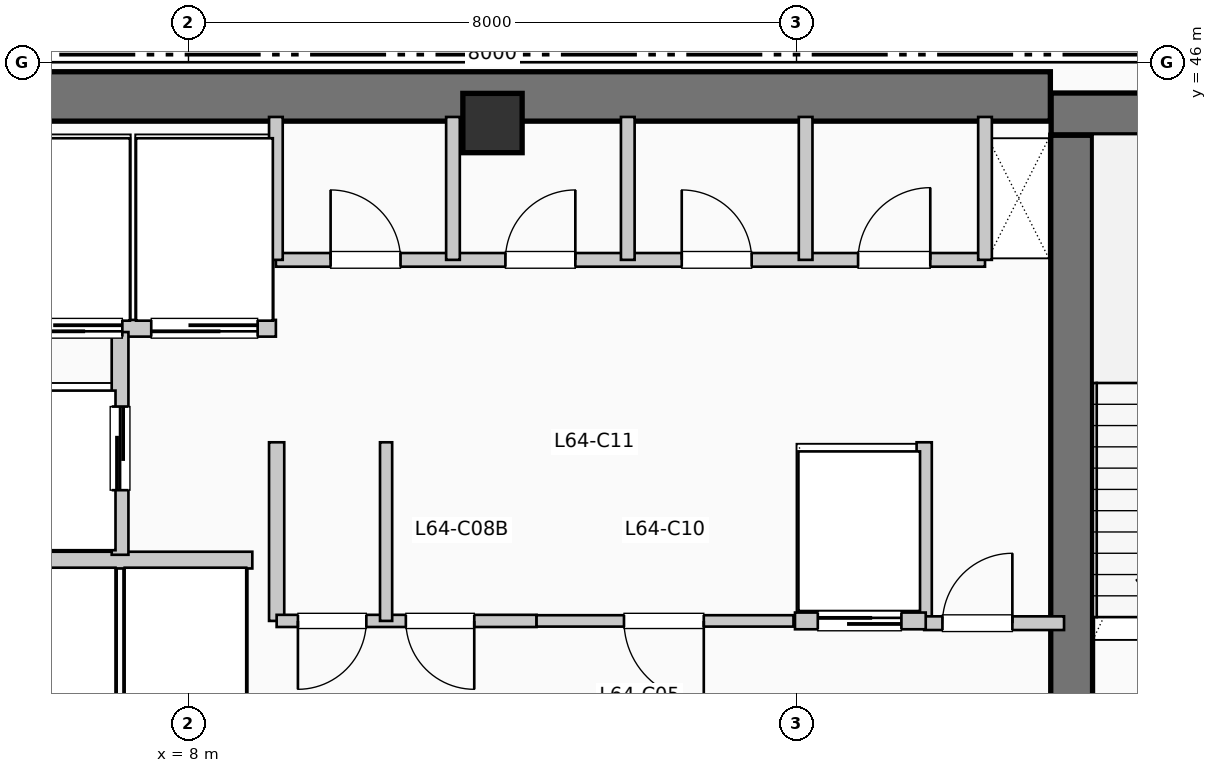
"""IFC4 building model, lengths in metres.
Left out: names, types, materials, properties, quantities, classifications, styles, units other than length and angle.
Written with IfcOpenShell. Run it as: python <this file> out.ifc"""

import sys

from ifc_helpers import new_model, si_unit, direction, frame, frame_2d, origin, origin_2d, place, context, subcontext, project, spatial, rectangle, extrude, element, fill, save


model = new_model("IFC4")
c1 = context("Model", 3, precision=1e-05, world=origin(), true_north=direction((0.0, 1.0)))
c2 = subcontext(c1, "Body", "Model", "MODEL_VIEW")
j1 = project(units=[si_unit("LENGTHUNIT", "METRE"), si_unit("PLANEANGLEUNIT", "RADIAN")], contexts=[c1])
p1 = place(None, origin())
s1 = spatial("IfcSite", under=j1, at=p1, CompositionType="ELEMENT")
p2 = place(p1, origin())
s2 = spatial("IfcBuilding", under=s1, at=p2, CompositionType="ELEMENT")
p3 = place(p2, frame((0.0, 0.0, 264.33)))
s3 = spatial("IfcBuildingStorey", under=s2, at=p3, CompositionType="ELEMENT", Elevation=264.33)
p4 = place(p3, frame((5.36, 45.55, 0.0), z_axis=(0.0, 0.0, 1.0), x_axis=(1.0, 0.0, 0.0)))
e1 = element("IfcWall", 1, at=p4, inside=s3, PredefinedType="SHEAR", context=c2, shape_type="SweptSolid", body=[
    extrude(rectangle(XDim=13.98, YDim=0.65, at=frame_2d((6.99, 0.0))), origin(), (0.0, 0.0, 1.0), 3.96),
])
p5 = place(p3, frame((19.62, 37.15, 0.0), z_axis=(0.0, 0.0, 1.0), x_axis=(0.0, 1.0, 0.0)))
e2 = element("IfcWall", 2, at=p5, inside=s3, PredefinedType="SHEAR", context=c2, shape_type="SweptSolid", body=[
    extrude(rectangle(XDim=7.89, YDim=0.55, at=frame_2d((3.945, 0.0))), origin(), (0.0, 0.0, 1.0), 3.96),
])
p6 = place(p3, frame((19.35, 45.32, 0.0), z_axis=(0.0, 0.0, 1.0), x_axis=(1.0, 0.0, 0.0)))
e3 = element("IfcWall", 3, at=p6, inside=s3, PredefinedType="SHEAR", context=c2, shape_type="SweptSolid", body=[
    extrude(rectangle(XDim=3.69, YDim=0.55, at=frame_2d((1.845, 0.0))), origin(), (0.0, 0.0, 1.0), 3.96),
])
p7 = place(p6, frame((1.15, 0.0, 1.05)))
e4 = element("IfcOpeningElement", 4, at=p7, cuts=e3, PredefinedType="OPENING", context=c2, shape_type="SweptSolid", body=[
    extrude(rectangle(XDim=1.4, YDim=1.8, at=frame_2d((0.7, 0.9))), frame((0.0, 0.285, 0.0), z_axis=(0.0, -1.0, 0.0), x_axis=(1.0, 0.0, 0.0)), (0.0, 0.0, 1.0), 0.57),
])
p8 = place(p3, frame((12.0, 45.2, 0.0), z_axis=(0.0, 0.0, 1.0), x_axis=(1.0, 0.0, 0.0)))
e5 = element("IfcColumn", 5, at=p8, inside=s3, PredefinedType="COLUMN", context=c2, shape_type="SweptSolid", body=[
    extrude(rectangle(XDim=0.78, YDim=0.78, at=origin_2d()), origin(), (0.0, 0.0, 1.0), 3.96),
])
p9 = place(p3, frame((5.38, 39.45, 0.0), z_axis=(0.0, 0.0, 1.0), x_axis=(1.0, 0.0, 0.0)))
e6 = element("IfcWall", 6, at=p9, inside=s3, PredefinedType="PARTITIONING", context=c2, shape_type="SweptSolid", body=[
    extrude(rectangle(XDim=3.46, YDim=0.22, at=frame_2d((1.73, 0.0))), origin(), (0.0, 0.0, 1.0), 3.71),
])
p10 = place(p3, frame((5.38, 42.5, 0.0), z_axis=(0.0, 0.0, 1.0), x_axis=(1.0, 0.0, 0.0)))
e7 = element("IfcWall", 7, at=p10, inside=s3, PredefinedType="PARTITIONING", context=c2, shape_type="SweptSolid", body=[
    extrude(rectangle(XDim=3.77, YDim=0.22, at=frame_2d((1.885, 0.0))), origin(), (0.0, 0.0, 1.0), 3.71),
])
p11 = place(p10, frame((1.75, 0.0, 0.0), z_axis=(0.0, 0.0, 1.0), x_axis=(-1.0, 0.0, 0.0)))
e8 = element("IfcOpeningElement", 8, at=p11, cuts=e7, PredefinedType="OPENING", context=c2, shape_type="SweptSolid", body=[
    extrude(rectangle(XDim=1.4, YDim=2.2, at=frame_2d((0.7, 1.1))), frame((0.0, 0.12, 0.0), z_axis=(0.0, -1.0, 0.0), x_axis=(1.0, 0.0, 0.0)), (0.0, 0.0, 1.0), 0.24),
])
p12 = place(p10, frame((3.53, 0.0, 0.0), z_axis=(0.0, 0.0, 1.0), x_axis=(-1.0, 0.0, 0.0)))
e9 = element("IfcOpeningElement", 9, at=p12, cuts=e7, PredefinedType="OPENING", context=c2, shape_type="SweptSolid", body=[
    extrude(rectangle(XDim=1.4, YDim=2.2, at=frame_2d((0.7, 1.1))), frame((0.0, 0.12, 0.0), z_axis=(0.0, -1.0, 0.0), x_axis=(1.0, 0.0, 0.0)), (0.0, 0.0, 1.0), 0.24),
])
p13 = place(p3, frame((7.1, 39.52, 0.0), z_axis=(0.0, 0.0, 1.0), x_axis=(0.0, 1.0, 0.0)))
e10 = element("IfcWall", 10, at=p13, inside=s3, PredefinedType="PARTITIONING", context=c2, shape_type="SweptSolid", body=[
    extrude(rectangle(XDim=2.93, YDim=0.22, at=frame_2d((1.465, 0.0))), origin(), (0.0, 0.0, 1.0), 3.71),
])
p14 = place(p13, frame((0.85, 0.0, 0.0)))
e11 = element("IfcOpeningElement", 11, at=p14, cuts=e10, PredefinedType="OPENING", context=c2, shape_type="SweptSolid", body=[
    extrude(rectangle(XDim=1.1, YDim=2.2, at=frame_2d((0.55, 1.1))), frame((0.0, 0.12, 0.0), z_axis=(0.0, -1.0, 0.0), x_axis=(1.0, 0.0, 0.0)), (0.0, 0.0, 1.0), 0.24),
])
for number, where, z_axis, x_axis in (
    (12, (9.16, 38.65, 0.0), (0.0, 0.0, 1.0), (0.0, 1.0, 0.0)),
    (13, (17.68, 38.65, 0.0), (0.0, 0.0, 1.0), (0.0, 1.0, 0.0)),
):
    element("IfcWall", number, at=place(p3, frame(where, z_axis=z_axis, x_axis=x_axis)), inside=s3, PredefinedType="PARTITIONING", context=c2, shape_type="SweptSolid", body=[
        extrude(rectangle(XDim=2.35, YDim=0.2, at=frame_2d((1.175, 0.0))), origin(), (0.0, 0.0, 1.0), 3.71),
    ])
p15 = place(p3, frame((17.68, 38.62, 0.0), z_axis=(0.0, 0.0, 1.0), x_axis=(1.0, 0.0, 0.0)))
e14 = element("IfcWall", 14, at=p15, inside=s3, PredefinedType="PARTITIONING", context=c2, shape_type="SweptSolid", body=[
    extrude(rectangle(XDim=1.84, YDim=0.18, at=frame_2d((0.92, 0.0))), origin(), (0.0, 0.0, 1.0), 3.71),
])
p16 = place(p15, frame((0.24, 0.0, 0.0)))
e15 = element("IfcOpeningElement", 15, at=p16, cuts=e14, PredefinedType="OPENING", context=c2, shape_type="SweptSolid", body=[
    extrude(rectangle(XDim=0.92, YDim=2.1, at=frame_2d((0.46, 1.05))), frame((0.0, 0.1, 0.0), z_axis=(0.0, -1.0, 0.0), x_axis=(1.0, 0.0, 0.0)), (0.0, 0.0, 1.0), 0.2),
])
p17 = place(p3, frame((9.16, 38.65, 0.0), z_axis=(0.0, 0.0, 1.0), x_axis=(1.0, 0.0, 0.0)))
e16 = element("IfcWall", 16, at=p17, inside=s3, PredefinedType="PARTITIONING", context=c2, shape_type="SweptSolid", body=[
    extrude(rectangle(XDim=3.42, YDim=0.16, at=frame_2d((1.71, 0.0))), origin(), (0.0, 0.0, 1.0), 3.71),
])
p18 = place(p17, frame((1.18, 0.0, 0.0), z_axis=(0.0, 0.0, 1.0), x_axis=(-1.0, 0.0, 0.0)))
e17 = element("IfcOpeningElement", 17, at=p18, cuts=e16, PredefinedType="OPENING", context=c2, shape_type="SweptSolid", body=[
    extrude(rectangle(XDim=0.9, YDim=2.15, at=frame_2d((0.45, 1.075))), frame((0.0, 0.09, 0.0), z_axis=(0.0, -1.0, 0.0), x_axis=(1.0, 0.0, 0.0)), (0.0, 0.0, 1.0), 0.18),
])
p19 = place(p17, frame((2.6, 0.0, 0.0), z_axis=(0.0, 0.0, 1.0), x_axis=(-1.0, 0.0, 0.0)))
e18 = element("IfcOpeningElement", 18, at=p19, cuts=e16, PredefinedType="OPENING", context=c2, shape_type="SweptSolid", body=[
    extrude(rectangle(XDim=0.9, YDim=2.15, at=frame_2d((0.45, 1.075))), frame((0.0, 0.09, 0.0), z_axis=(0.0, -1.0, 0.0), x_axis=(1.0, 0.0, 0.0)), (0.0, 0.0, 1.0), 0.18),
])
p20 = place(p3, frame((10.6, 38.65, 0.0), z_axis=(0.0, 0.0, 1.0), x_axis=(0.0, 1.0, 0.0)))
e19 = element("IfcWall", 19, at=p20, inside=s3, PredefinedType="PARTITIONING", context=c2, shape_type="SweptSolid", body=[
    extrude(rectangle(XDim=2.35, YDim=0.16, at=frame_2d((1.175, 0.0))), origin(), (0.0, 0.0, 1.0), 3.71),
])
p21 = place(p3, frame((12.58, 38.65, 0.0), z_axis=(0.0, 0.0, 1.0), x_axis=(1.0, 0.0, 0.0)))
e20 = element("IfcWall", 20, at=p21, inside=s3, PredefinedType="PARTITIONING", context=c2, shape_type="SweptSolid", body=[
    extrude(rectangle(XDim=3.38, YDim=0.15, at=frame_2d((1.69, 0.0))), origin(), (0.0, 0.0, 1.0), 3.71),
])
p22 = place(p21, frame((2.2, 0.0, 0.0), z_axis=(0.0, 0.0, 1.0), x_axis=(-1.0, 0.0, 0.0)))
e21 = element("IfcOpeningElement", 21, at=p22, cuts=e20, PredefinedType="OPENING", context=c2, shape_type="SweptSolid", body=[
    extrude(rectangle(XDim=1.05, YDim=2.15, at=frame_2d((0.525, 1.075))), frame((0.0, 0.085, 0.0), z_axis=(0.0, -1.0, 0.0), x_axis=(1.0, 0.0, 0.0)), (0.0, 0.0, 1.0), 0.17),
])
p23 = place(p3, frame((15.98, 38.65, 0.0), z_axis=(0.0, 0.0, 1.0), x_axis=(1.0, 0.0, 0.0)))
e22 = element("IfcWall", 22, at=p23, inside=s3, PredefinedType="PARTITIONING", context=c2, shape_type="SweptSolid", body=[
    extrude(rectangle(XDim=1.72, YDim=0.22, at=frame_2d((0.86, 0.0))), origin(), (0.0, 0.0, 1.0), 3.71),
])
p24 = place(p23, frame((0.3, 0.0, 0.0)))
e23 = element("IfcOpeningElement", 23, at=p24, cuts=e22, PredefinedType="OPENING", context=c2, shape_type="SweptSolid", body=[
    extrude(rectangle(XDim=1.1, YDim=2.2, at=frame_2d((0.55, 1.1))), frame((0.0, 0.12, 0.0), z_axis=(0.0, -1.0, 0.0), x_axis=(1.0, 0.0, 0.0)), (0.0, 0.0, 1.0), 0.24),
])
p25 = place(p3, frame((9.15, 43.4, 0.0), z_axis=(0.0, 0.0, 1.0), x_axis=(1.0, 0.0, 0.0)))
e24 = element("IfcWall", 24, at=p25, inside=s3, PredefinedType="PLUMBINGWALL", context=c2, shape_type="SweptSolid", body=[
    extrude(rectangle(XDim=9.33, YDim=0.18, at=frame_2d((4.665, 0.0))), origin(), (0.0, 0.0, 1.0), 3.71),
])
p26 = place(p25, frame((0.72, 0.0, 0.0)))
e25 = element("IfcOpeningElement", 25, at=p26, cuts=e24, PredefinedType="OPENING", context=c2, shape_type="SweptSolid", body=[
    extrude(rectangle(XDim=0.92, YDim=2.1, at=frame_2d((0.46, 1.05))), frame((0.0, 0.1, 0.0), z_axis=(0.0, -1.0, 0.0), x_axis=(1.0, 0.0, 0.0)), (0.0, 0.0, 1.0), 0.2),
])
p27 = place(p25, frame((3.02, 0.0, 0.0)))
e26 = element("IfcOpeningElement", 26, at=p27, cuts=e24, PredefinedType="OPENING", context=c2, shape_type="SweptSolid", body=[
    extrude(rectangle(XDim=0.92, YDim=2.1, at=frame_2d((0.46, 1.05))), frame((0.0, 0.1, 0.0), z_axis=(0.0, -1.0, 0.0), x_axis=(1.0, 0.0, 0.0)), (0.0, 0.0, 1.0), 0.2),
])
p28 = place(p25, frame((5.34, 0.0, 0.0)))
e27 = element("IfcOpeningElement", 27, at=p28, cuts=e24, PredefinedType="OPENING", context=c2, shape_type="SweptSolid", body=[
    extrude(rectangle(XDim=0.92, YDim=2.1, at=frame_2d((0.46, 1.05))), frame((0.0, 0.1, 0.0), z_axis=(0.0, -1.0, 0.0), x_axis=(1.0, 0.0, 0.0)), (0.0, 0.0, 1.0), 0.2),
])
p29 = place(p25, frame((7.66, 0.0, 0.0)))
e28 = element("IfcOpeningElement", 28, at=p29, cuts=e24, PredefinedType="OPENING", context=c2, shape_type="SweptSolid", body=[
    extrude(rectangle(XDim=0.95, YDim=2.1, at=frame_2d((0.475, 1.05))), frame((0.0, 0.1, 0.0), z_axis=(0.0, -1.0, 0.0), x_axis=(1.0, 0.0, 0.0)), (0.0, 0.0, 1.0), 0.2),
])
for number, where, z_axis, x_axis in (
    (29, (9.15, 43.4, 0.0), (0.0, 0.0, 1.0), (0.0, 1.0, 0.0)),
    (30, (18.48, 43.4, 0.0), (0.0, 0.0, 1.0), (0.0, 1.0, 0.0)),
    (31, (11.48, 43.4, 0.0), (0.0, 0.0, 1.0), (0.0, 1.0, 0.0)),
    (32, (13.78, 43.4, 0.0), (0.0, 0.0, 1.0), (0.0, 1.0, 0.0)),
    (33, (16.12, 43.4, 0.0), (0.0, 0.0, 1.0), (0.0, 1.0, 0.0)),
):
    element("IfcWall", number, at=place(p3, frame(where, z_axis=z_axis, x_axis=x_axis)), inside=s3, PredefinedType="PLUMBINGWALL", context=c2, shape_type="SweptSolid", body=[
        extrude(rectangle(XDim=1.88, YDim=0.18, at=frame_2d((0.94, 0.0))), origin(), (0.0, 0.0, 1.0), 3.71),
    ])
p30 = place(p11, origin())
e34 = element("IfcDoor", 34, at=p30, inside=s3, OperationType="SLIDING_TO_LEFT", PredefinedType="DOOR", context=c2, shape_type="SweptSolid", body=[
    extrude(rectangle(XDim=1.4, YDim=2.2, at=frame_2d((0.7, 1.1))), frame((0.0, 0.025, 0.0), z_axis=(0.0, -1.0, 0.0), x_axis=(1.0, 0.0, 0.0)), (0.0, 0.0, 1.0), 0.05),
])
fill(e8, e34)
p31 = place(p12, origin())
e35 = element("IfcDoor", 35, at=p31, inside=s3, OperationType="SLIDING_TO_LEFT", PredefinedType="DOOR", context=c2, shape_type="SweptSolid", body=[
    extrude(rectangle(XDim=1.4, YDim=2.2, at=frame_2d((0.7, 1.1))), frame((0.0, 0.025, 0.0), z_axis=(0.0, -1.0, 0.0), x_axis=(1.0, 0.0, 0.0)), (0.0, 0.0, 1.0), 0.05),
])
fill(e9, e35)
p32 = place(p14, origin())
e36 = element("IfcDoor", 36, at=p32, inside=s3, OperationType="SLIDING_TO_LEFT", PredefinedType="DOOR", context=c2, shape_type="SweptSolid", body=[
    extrude(rectangle(XDim=1.1, YDim=2.2, at=frame_2d((0.55, 1.1))), frame((0.0, 0.025, 0.0), z_axis=(0.0, -1.0, 0.0), x_axis=(1.0, 0.0, 0.0)), (0.0, 0.0, 1.0), 0.05),
])
fill(e11, e36)
p33 = place(p16, origin())
e37 = element("IfcDoor", 37, at=p33, inside=s3, OperationType="SINGLE_SWING_RIGHT", PredefinedType="DOOR", context=c2, shape_type="SweptSolid", body=[
    extrude(rectangle(XDim=0.92, YDim=2.1, at=frame_2d((0.46, 1.05))), frame((0.0, 0.025, 0.0), z_axis=(0.0, -1.0, 0.0), x_axis=(1.0, 0.0, 0.0)), (0.0, 0.0, 1.0), 0.05),
])
fill(e15, e37)
p34 = place(p18, origin())
e38 = element("IfcDoor", 38, at=p34, inside=s3, OperationType="SINGLE_SWING_LEFT", PredefinedType="DOOR", context=c2, shape_type="SweptSolid", body=[
    extrude(rectangle(XDim=0.9, YDim=2.15, at=frame_2d((0.45, 1.075))), frame((0.0, 0.025, 0.0), z_axis=(0.0, -1.0, 0.0), x_axis=(1.0, 0.0, 0.0)), (0.0, 0.0, 1.0), 0.05),
])
fill(e17, e38)
p35 = place(p19, origin())
e39 = element("IfcDoor", 39, at=p35, inside=s3, OperationType="SINGLE_SWING_RIGHT", PredefinedType="DOOR", context=c2, shape_type="SweptSolid", body=[
    extrude(rectangle(XDim=0.9, YDim=2.15, at=frame_2d((0.45, 1.075))), frame((0.0, 0.025, 0.0), z_axis=(0.0, -1.0, 0.0), x_axis=(1.0, 0.0, 0.0)), (0.0, 0.0, 1.0), 0.05),
])
fill(e18, e39)
p36 = place(p22, origin())
e40 = element("IfcDoor", 40, at=p36, inside=s3, OperationType="SINGLE_SWING_RIGHT", PredefinedType="DOOR", context=c2, shape_type="SweptSolid", body=[
    extrude(rectangle(XDim=1.05, YDim=2.15, at=frame_2d((0.525, 1.075))), frame((0.0, 0.025, 0.0), z_axis=(0.0, -1.0, 0.0), x_axis=(1.0, 0.0, 0.0)), (0.0, 0.0, 1.0), 0.05),
])
fill(e21, e40)
p37 = place(p24, origin())
e41 = element("IfcDoor", 41, at=p37, inside=s3, OperationType="SLIDING_TO_LEFT", PredefinedType="DOOR", context=c2, shape_type="SweptSolid", body=[
    extrude(rectangle(XDim=1.1, YDim=2.2, at=frame_2d((0.55, 1.1))), frame((0.0, 0.025, 0.0), z_axis=(0.0, -1.0, 0.0), x_axis=(1.0, 0.0, 0.0)), (0.0, 0.0, 1.0), 0.05),
])
fill(e23, e41)
p38 = place(p26, origin())
e42 = element("IfcDoor", 42, at=p38, inside=s3, OperationType="SINGLE_SWING_LEFT", PredefinedType="DOOR", context=c2, shape_type="SweptSolid", body=[
    extrude(rectangle(XDim=0.92, YDim=2.1, at=frame_2d((0.46, 1.05))), frame((0.0, 0.025, 0.0), z_axis=(0.0, -1.0, 0.0), x_axis=(1.0, 0.0, 0.0)), (0.0, 0.0, 1.0), 0.05),
])
fill(e25, e42)
p39 = place(p27, origin())
e43 = element("IfcDoor", 43, at=p39, inside=s3, OperationType="SINGLE_SWING_RIGHT", PredefinedType="DOOR", context=c2, shape_type="SweptSolid", body=[
    extrude(rectangle(XDim=0.92, YDim=2.1, at=frame_2d((0.46, 1.05))), frame((0.0, 0.025, 0.0), z_axis=(0.0, -1.0, 0.0), x_axis=(1.0, 0.0, 0.0)), (0.0, 0.0, 1.0), 0.05),
])
fill(e26, e43)
p40 = place(p28, origin())
e44 = element("IfcDoor", 44, at=p40, inside=s3, OperationType="SINGLE_SWING_LEFT", PredefinedType="DOOR", context=c2, shape_type="SweptSolid", body=[
    extrude(rectangle(XDim=0.92, YDim=2.1, at=frame_2d((0.46, 1.05))), frame((0.0, 0.025, 0.0), z_axis=(0.0, -1.0, 0.0), x_axis=(1.0, 0.0, 0.0)), (0.0, 0.0, 1.0), 0.05),
])
fill(e27, e44)
p41 = place(p29, origin())
e45 = element("IfcDoor", 45, at=p41, inside=s3, OperationType="SINGLE_SWING_RIGHT", PredefinedType="DOOR", context=c2, shape_type="SweptSolid", body=[
    extrude(rectangle(XDim=0.95, YDim=2.1, at=frame_2d((0.475, 1.05))), frame((0.0, 0.025, 0.0), z_axis=(0.0, -1.0, 0.0), x_axis=(1.0, 0.0, 0.0)), (0.0, 0.0, 1.0), 0.05),
])
fill(e28, e45)
save(model, sys.argv[1])
